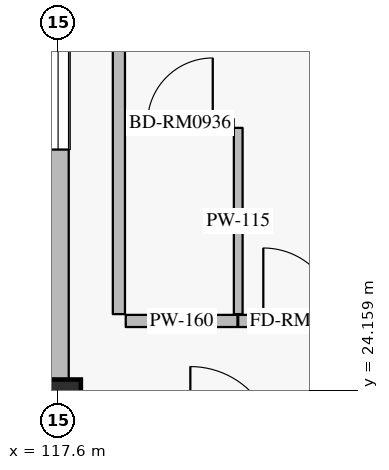
"""IFC4 building model, lengths in metres.
Left out: names, types, materials, properties, quantities, classifications, styles, units other than length and angle.
Written with IfcOpenShell. Run it as: python <this file> out.ifc"""

import sys

from ifc_helpers import new_model, si_unit, direction, frame, frame_2d, origin, origin_2d, place, context, subcontext, project, spatial, rectangle, extrude, element, fill, save


model = new_model("IFC4")
c1 = context("Model", 3, precision=1e-05, world=origin(), true_north=direction((0.0, 1.0)))
c2 = subcontext(c1, "Body", "Model", "MODEL_VIEW")
j1 = project(units=[si_unit("LENGTHUNIT", "METRE"), si_unit("PLANEANGLEUNIT", "RADIAN")], contexts=[c1])
p1 = place(None, origin())
s1 = spatial("IfcSite", under=j1, at=p1, CompositionType="ELEMENT")
p2 = place(p1, origin())
s2 = spatial("IfcBuilding", under=s1, at=p2, CompositionType="ELEMENT")
p3 = place(p2, frame((0.0, 0.0, 36.0)))
s3 = spatial("IfcBuildingStorey", under=s2, at=p3, CompositionType="ELEMENT", Elevation=36.0)
p4 = place(p3, frame((117.6, 24.0, 0.0), z_axis=(0.0, 0.0, 1.0), x_axis=(1.0, 0.0, 0.0)))
e1 = element("IfcColumn", 1, at=p4, inside=s3, PredefinedType="COLUMN", context=c2, shape_type="SweptSolid", body=[
    extrude(rectangle(XDim=0.6, YDim=0.6, at=origin_2d()), origin(), (0.0, 0.0, 1.0), 3.6),
])
p5 = place(p3, frame((117.6, 24.3, 0.0), z_axis=(0.0, 0.0, 1.0), x_axis=(0.0, 1.0, 0.0)))
e2 = element("IfcWall", 2, at=p5, inside=s3, PredefinedType="SOLIDWALL", context=c2, shape_type="SweptSolid", body=[
    extrude(rectangle(XDim=7.35, YDim=0.28, at=frame_2d((3.675, 0.0))), origin(), (0.0, 0.0, 1.0), 2.7),
])
p6 = place(p5, frame((3.025, 0.0, 0.5)))
e3 = element("IfcOpeningElement", 3, at=p6, cuts=e2, PredefinedType="OPENING", context=c2, shape_type="SweptSolid", body=[
    extrude(rectangle(XDim=1.3, YDim=1.65, at=frame_2d((0.65, 0.825))), frame((0.0, 0.15, 0.0), z_axis=(0.0, -1.0, 0.0), x_axis=(1.0, 0.0, 0.0)), (0.0, 0.0, 1.0), 0.3),
])
p7 = place(p3, frame((118.49, 25.07, 0.0), z_axis=(0.0, 0.0, 1.0), x_axis=(1.0, 0.0, 0.0)))
e4 = element("IfcWall", 4, at=p7, inside=s3, PredefinedType="PARTITIONING", context=c2, shape_type="SweptSolid", body=[
    extrude(rectangle(XDim=1.47, YDim=0.16, at=frame_2d((0.735, 0.0))), origin(), (0.0, 0.0, 1.0), 3.365),
])
p8 = place(p3, frame((119.97, 25.07, 0.0), z_axis=(0.0, 0.0, 1.0), x_axis=(1.0, 0.0, 0.0)))
e5 = element("IfcWall", 5, at=p8, inside=s3, PredefinedType="PARTITIONING", context=c2, shape_type="SweptSolid", body=[
    extrude(rectangle(XDim=1.62, YDim=0.16, at=frame_2d((0.81, 0.0))), origin(), (0.0, 0.0, 1.0), 3.365),
])
p9 = place(p8, frame((0.33, 0.0, 0.0)))
e6 = element("IfcOpeningElement", 6, at=p9, cuts=e5, PredefinedType="OPENING", context=c2, shape_type="SweptSolid", body=[
    extrude(rectangle(XDim=0.96, YDim=2.2, at=frame_2d((0.48, 1.1))), frame((0.0, 0.09, 0.0), z_axis=(0.0, -1.0, 0.0), x_axis=(1.0, 0.0, 0.0)), (0.0, 0.0, 1.0), 0.18),
])
p10 = place(p3, frame((119.97, 25.16, 0.0), z_axis=(0.0, 0.0, 1.0), x_axis=(0.0, 1.0, 0.0)))
e7 = element("IfcWall", 7, at=p10, inside=s3, PredefinedType="PARTITIONING", context=c2, shape_type="SweptSolid", body=[
    extrude(rectangle(XDim=2.45, YDim=0.115, at=frame_2d((1.225, 0.0))), origin(), (0.0, 0.0, 1.0), 3.365),
])
p11 = place(p3, frame((118.5, 27.67, 0.0), z_axis=(0.0, 0.0, 1.0), x_axis=(1.0, 0.0, 0.0)))
e8 = element("IfcWall", 8, at=p11, inside=s3, PredefinedType="PARTITIONING", context=c2, shape_type="SweptSolid", body=[
    extrude(rectangle(XDim=1.41, YDim=0.115, at=frame_2d((0.705, 0.0))), origin(), (0.0, 0.0, 1.0), 3.365),
])
p12 = place(p11, frame((0.275, 0.0, 0.0)))
e9 = element("IfcOpeningElement", 9, at=p12, cuts=e8, PredefinedType="OPENING", context=c2, shape_type="SweptSolid", body=[
    extrude(rectangle(XDim=0.86, YDim=2.12, at=frame_2d((0.43, 1.06))), frame((0.0, 0.067, 0.0), z_axis=(0.0, -1.0, 0.0), x_axis=(1.0, 0.0, 0.0)), (0.0, 0.0, 1.0), 0.135),
])
p13 = place(p3, frame((118.4, 25.16, 0.0), z_axis=(0.0, 0.0, 1.0), x_axis=(0.0, 1.0, 0.0)))
e10 = element("IfcWall", 10, at=p13, inside=s3, PredefinedType="PARTITIONING", context=c2, shape_type="SweptSolid", body=[
    extrude(rectangle(XDim=6.5, YDim=0.16, at=frame_2d((3.25, 0.0))), origin(), (0.0, 0.0, 1.0), 3.365),
])
p14 = place(p6, origin())
e11 = element("IfcWindow", 11, at=p14, inside=s3, PartitioningType="SINGLE_PANEL", PredefinedType="WINDOW", context=c2, shape_type="SweptSolid", body=[
    extrude(rectangle(XDim=1.3, YDim=1.65, at=frame_2d((0.65, 0.825))), frame((0.0, 0.03, 0.0), z_axis=(0.0, -1.0, 0.0), x_axis=(1.0, 0.0, 0.0)), (0.0, 0.0, 1.0), 0.06),
])
fill(e3, e11)
p15 = place(p9, origin())
e12 = element("IfcDoor", 12, at=p15, inside=s3, OperationType="SINGLE_SWING_LEFT", PredefinedType="DOOR", context=c2, shape_type="SweptSolid", body=[
    extrude(rectangle(XDim=0.96, YDim=2.2, at=frame_2d((0.48, 1.1))), frame((0.0, 0.025, 0.0), z_axis=(0.0, -1.0, 0.0), x_axis=(1.0, 0.0, 0.0)), (0.0, 0.0, 1.0), 0.05),
])
fill(e6, e12)
p16 = place(p12, origin())
e13 = element("IfcDoor", 13, at=p16, inside=s3, OperationType="SINGLE_SWING_RIGHT", PredefinedType="DOOR", context=c2, shape_type="SweptSolid", body=[
    extrude(rectangle(XDim=0.86, YDim=2.12, at=frame_2d((0.43, 1.06))), frame((0.0, 0.025, 0.0), z_axis=(0.0, -1.0, 0.0), x_axis=(1.0, 0.0, 0.0)), (0.0, 0.0, 1.0), 0.05),
])
fill(e9, e13)
save(model, sys.argv[1])
